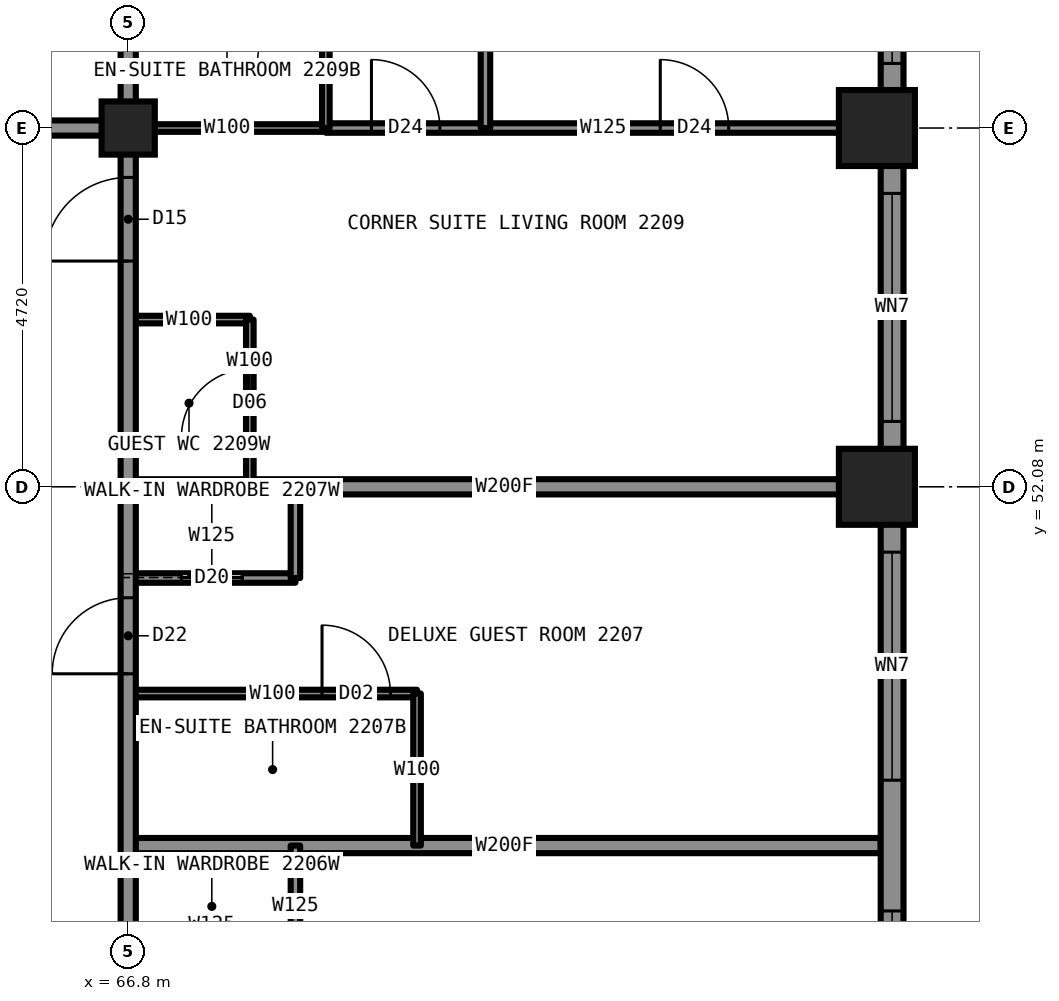
"""IFC4 building model, lengths in metres.
Left out: names, types, materials, properties, quantities, classifications, styles, units other than length and angle.
Written with IfcOpenShell. Run it as: python <this file> out.ifc"""

import sys

from ifc_helpers import new_model, si_unit, direction, frame, frame_2d, origin, origin_2d, place, context, subcontext, project, spatial, rectangle, hollow_rectangle, i_section, extrude, element, fill, save


model = new_model("IFC4")
c1 = context("Model", 3, precision=1e-05, world=origin(), true_north=direction((0.0, 1.0)))
c2 = subcontext(c1, "Body", "Model", "MODEL_VIEW")
j1 = project(units=[si_unit("LENGTHUNIT", "METRE"), si_unit("PLANEANGLEUNIT", "RADIAN")], contexts=[c1])
p1 = place(None, origin())
s1 = spatial("IfcSite", under=j1, at=p1, CompositionType="ELEMENT")
p2 = place(p1, origin())
s2 = spatial("IfcBuilding", under=s1, at=p2, CompositionType="ELEMENT")
p3 = place(p2, frame((0.0, 0.0, 81.0)))
s3 = spatial("IfcBuildingStorey", under=s2, at=p3, CompositionType="ELEMENT", Elevation=81.0)
for number, where, z_axis, x_axis in (
    (1, (76.65, 52.08, 0.0), (0.0, 0.0, 1.0), (1.0, 0.0, 0.0)),
    (2, (76.65, 56.8, 0.0), (0.0, 0.0, 1.0), (1.0, 0.0, 0.0)),
):
    element("IfcColumn", number, at=place(p3, frame(where, z_axis=z_axis, x_axis=x_axis)), inside=s3, PredefinedType="COLUMN", context=c2, shape_type="SweptSolid", body=[
        extrude(i_section(OverallWidth=0.432, OverallDepth=0.498, WebThickness=0.056, FlangeThickness=0.089, at=origin_2d()), origin(), (0.0, 0.0, 1.0), 3.5),
    ])
p4 = place(p3, frame((66.8, 56.8, 0.0), z_axis=(0.0, 0.0, 1.0), x_axis=(1.0, 0.0, 0.0)))
e3 = element("IfcColumn", 3, at=p4, inside=s3, PredefinedType="COLUMN", context=c2, shape_type="SweptSolid", body=[
    extrude(hollow_rectangle(XDim=0.7, YDim=0.7, WallThickness=0.06, at=origin_2d()), origin(), (0.0, 0.0, 1.0), 3.5),
])
p5 = place(p3, frame((66.8, 56.8, 0.0), z_axis=(0.0, 0.0, 1.0), x_axis=(1.0, 0.0, 0.0)))
e4 = element("IfcWall", 4, at=p5, inside=s3, PredefinedType="PARTITIONING", context=c2, shape_type="SweptSolid", body=[
    extrude(rectangle(XDim=2.6, YDim=0.1, at=frame_2d((1.3, 0.0))), origin(), (0.0, 0.0, 1.0), 2.573),
])
p6 = place(p3, frame((43.2, 56.8, 0.0), z_axis=(0.0, 0.0, 1.0), x_axis=(1.0, 0.0, 0.0)))
e5 = element("IfcWall", 5, at=p6, inside=s3, PredefinedType="PARTITIONING", context=c2, shape_type="SweptSolid", body=[
    extrude(rectangle(XDim=23.6, YDim=0.2, at=frame_2d((11.8, 0.0))), origin(), (0.0, 0.0, 1.0), 3.33),
])
p7 = place(p6, frame((0.7, 0.0, 0.0)))
e6 = element("IfcOpeningElement", 6, at=p7, cuts=e5, PredefinedType="OPENING", context=c2, shape_type="SweptSolid", body=[
    extrude(rectangle(XDim=1.0, YDim=2.2, at=frame_2d((0.5, 1.1))), frame((0.0, 0.11, 0.0), z_axis=(0.0, -1.0, 0.0), x_axis=(1.0, 0.0, 0.0)), (0.0, 0.0, 1.0), 0.22),
])
p8 = place(p6, frame((6.98, 0.0, 0.0)))
e7 = element("IfcOpeningElement", 7, at=p8, cuts=e5, PredefinedType="OPENING", context=c2, shape_type="SweptSolid", body=[
    extrude(rectangle(XDim=1.0, YDim=2.2, at=frame_2d((0.5, 1.1))), frame((0.0, 0.11, 0.0), z_axis=(0.0, -1.0, 0.0), x_axis=(1.0, 0.0, 0.0)), (0.0, 0.0, 1.0), 0.22),
])
p9 = place(p6, frame((11.29, 0.0, 0.0)))
e8 = element("IfcOpeningElement", 8, at=p9, cuts=e5, PredefinedType="OPENING", context=c2, shape_type="SweptSolid", body=[
    extrude(rectangle(XDim=1.1, YDim=2.2, at=frame_2d((0.55, 1.1))), frame((0.0, 0.11, 0.0), z_axis=(0.0, -1.0, 0.0), x_axis=(1.0, 0.0, 0.0)), (0.0, 0.0, 1.0), 0.22),
])
p10 = place(p3, frame((69.4, 56.8, 0.0), z_axis=(0.0, 0.0, 1.0), x_axis=(1.0, 0.0, 0.0)))
e9 = element("IfcWall", 9, at=p10, inside=s3, PredefinedType="PARTITIONING", context=c2, shape_type="SweptSolid", body=[
    extrude(rectangle(XDim=7.3, YDim=0.125, at=frame_2d((3.65, 0.0))), origin(), (0.0, 0.0, 1.0), 2.573),
])
p11 = place(p10, frame((0.6, 0.0, 0.0)))
e10 = element("IfcOpeningElement", 10, at=p11, cuts=e9, PredefinedType="OPENING", context=c2, shape_type="SweptSolid", body=[
    extrude(rectangle(XDim=0.9, YDim=2.2, at=frame_2d((0.45, 1.1))), frame((0.0, 0.073, 0.0), z_axis=(0.0, -1.0, 0.0), x_axis=(1.0, 0.0, 0.0)), (0.0, 0.0, 1.0), 0.145),
])
p12 = place(p10, frame((4.4, 0.0, 0.0)))
e11 = element("IfcOpeningElement", 11, at=p12, cuts=e9, PredefinedType="OPENING", context=c2, shape_type="SweptSolid", body=[
    extrude(rectangle(XDim=0.9, YDim=2.2, at=frame_2d((0.45, 1.1))), frame((0.0, 0.073, 0.0), z_axis=(0.0, -1.0, 0.0), x_axis=(1.0, 0.0, 0.0)), (0.0, 0.0, 1.0), 0.145),
])
p13 = place(p3, frame((66.8, 47.36, 0.0), z_axis=(0.0, 0.0, 1.0), x_axis=(1.0, 0.0, 0.0)))
e12 = element("IfcWall", 12, at=p13, inside=s3, PredefinedType="PARTITIONING", context=c2, shape_type="SweptSolid", body=[
    extrude(rectangle(XDim=9.9, YDim=0.2, at=frame_2d((4.95, 0.0))), origin(), (0.0, 0.0, 1.0), 2.723),
])
p14 = place(p3, frame((66.8, 49.36, 0.0), z_axis=(0.0, 0.0, 1.0), x_axis=(1.0, 0.0, 0.0)))
e13 = element("IfcWall", 13, at=p14, inside=s3, PredefinedType="PARTITIONING", context=c2, shape_type="SweptSolid", body=[
    extrude(rectangle(XDim=3.8, YDim=0.1, at=frame_2d((1.9, 0.0))), origin(), (0.0, 0.0, 1.0), 3.33),
])
p15 = place(p14, frame((2.55, 0.0, 0.0)))
e14 = element("IfcOpeningElement", 14, at=p15, cuts=e13, PredefinedType="OPENING", context=c2, shape_type="SweptSolid", body=[
    extrude(rectangle(XDim=0.9, YDim=2.1, at=frame_2d((0.45, 1.05))), frame((0.0, 0.06, 0.0), z_axis=(0.0, -1.0, 0.0), x_axis=(1.0, 0.0, 0.0)), (0.0, 0.0, 1.0), 0.12),
])
p16 = place(p3, frame((66.8, 50.88, 0.0), z_axis=(0.0, 0.0, 1.0), x_axis=(1.0, 0.0, 0.0)))
e15 = element("IfcWall", 15, at=p16, inside=s3, PredefinedType="PARTITIONING", context=c2, shape_type="SweptSolid", body=[
    extrude(rectangle(XDim=2.2, YDim=0.125, at=frame_2d((1.1, 0.0))), origin(), (0.0, 0.0, 1.0), 3.33),
])
p17 = place(p16, frame((0.7, 0.0, 0.0)))
e16 = element("IfcOpeningElement", 16, at=p17, cuts=e15, PredefinedType="OPENING", context=c2, shape_type="SweptSolid", body=[
    extrude(rectangle(XDim=0.8, YDim=2.1, at=frame_2d((0.4, 1.05))), frame((0.0, 0.073, 0.0), z_axis=(0.0, -1.0, 0.0), x_axis=(1.0, 0.0, 0.0)), (0.0, 0.0, 1.0), 0.145),
])
p18 = place(p3, frame((66.8, 52.08, 0.0), z_axis=(0.0, 0.0, 1.0), x_axis=(1.0, 0.0, 0.0)))
e17 = element("IfcWall", 17, at=p18, inside=s3, PredefinedType="PARTITIONING", context=c2, shape_type="SweptSolid", body=[
    extrude(rectangle(XDim=9.9, YDim=0.2, at=frame_2d((4.95, 0.0))), origin(), (0.0, 0.0, 1.0), 2.573),
])
p19 = place(p3, frame((66.8, 54.28, 0.0), z_axis=(0.0, 0.0, 1.0), x_axis=(1.0, 0.0, 0.0)))
e18 = element("IfcWall", 18, at=p19, inside=s3, PredefinedType="PARTITIONING", context=c2, shape_type="SweptSolid", body=[
    extrude(rectangle(XDim=1.6, YDim=0.1, at=frame_2d((0.8, 0.0))), origin(), (0.0, 0.0, 1.0), 2.723),
])
p20 = place(p3, frame((66.8, 33.2, 0.0), z_axis=(0.0, 0.0, 1.0), x_axis=(0.0, 1.0, 0.0)))
e19 = element("IfcWall", 19, at=p20, inside=s3, PredefinedType="PARTITIONING", context=c2, shape_type="SweptSolid", body=[
    extrude(rectangle(XDim=23.6, YDim=0.2, at=frame_2d((11.8, 0.0))), origin(), (0.0, 0.0, 1.0), 3.33),
])
p21 = place(p20, frame((7.72, 0.0, 0.0)))
e20 = element("IfcOpeningElement", 20, at=p21, cuts=e19, PredefinedType="OPENING", context=c2, shape_type="SweptSolid", body=[
    extrude(rectangle(XDim=1.0, YDim=2.2, at=frame_2d((0.5, 1.1))), frame((0.0, 0.11, 0.0), z_axis=(0.0, -1.0, 0.0), x_axis=(1.0, 0.0, 0.0)), (0.0, 0.0, 1.0), 0.22),
])
p22 = place(p20, frame((16.42, 0.0, 0.0)))
e21 = element("IfcOpeningElement", 21, at=p22, cuts=e19, PredefinedType="OPENING", context=c2, shape_type="SweptSolid", body=[
    extrude(rectangle(XDim=1.0, YDim=2.2, at=frame_2d((0.5, 1.1))), frame((0.0, 0.11, 0.0), z_axis=(0.0, -1.0, 0.0), x_axis=(1.0, 0.0, 0.0)), (0.0, 0.0, 1.0), 0.22),
])
p23 = place(p20, frame((21.85, 0.0, 0.0)))
e22 = element("IfcOpeningElement", 22, at=p23, cuts=e19, PredefinedType="OPENING", context=c2, shape_type="SweptSolid", body=[
    extrude(rectangle(XDim=1.1, YDim=2.2, at=frame_2d((0.55, 1.1))), frame((0.0, 0.11, 0.0), z_axis=(0.0, -1.0, 0.0), x_axis=(1.0, 0.0, 0.0)), (0.0, 0.0, 1.0), 0.22),
])
p24 = place(p20, frame((0.66, 0.0, 0.0)))
e23 = element("IfcOpeningElement", 23, at=p24, cuts=e19, PredefinedType="OPENING", context=c2, shape_type="SweptSolid", body=[
    extrude(rectangle(XDim=1.1, YDim=2.2, at=frame_2d((0.55, 1.1))), frame((0.0, 0.11, 0.0), z_axis=(0.0, -1.0, 0.0), x_axis=(1.0, 0.0, 0.0)), (0.0, 0.0, 1.0), 0.22),
])
p25 = place(p3, frame((66.8, 56.8, 0.0), z_axis=(0.0, 0.0, 1.0), x_axis=(0.0, 1.0, 0.0)))
e24 = element("IfcWall", 24, at=p25, inside=s3, PredefinedType="PARTITIONING", context=c2, shape_type="SweptSolid", body=[
    extrude(rectangle(XDim=9.9, YDim=0.2, at=frame_2d((4.95, 0.0))), origin(), (0.0, 0.0, 1.0), 2.573),
])
p26 = place(p3, frame((68.4, 52.08, 0.0), z_axis=(0.0, 0.0, 1.0), x_axis=(0.0, 1.0, 0.0)))
e25 = element("IfcWall", 25, at=p26, inside=s3, PredefinedType="PARTITIONING", context=c2, shape_type="SweptSolid", body=[
    extrude(rectangle(XDim=2.2, YDim=0.1, at=frame_2d((1.1, 0.0))), origin(), (0.0, 0.0, 1.0), 3.33),
])
p27 = place(p26, frame((0.65, 0.0, 0.0)))
e26 = element("IfcOpeningElement", 26, at=p27, cuts=e25, PredefinedType="OPENING", context=c2, shape_type="SweptSolid", body=[
    extrude(rectangle(XDim=0.9, YDim=2.1, at=frame_2d((0.45, 1.05))), frame((0.0, 0.06, 0.0), z_axis=(0.0, -1.0, 0.0), x_axis=(1.0, 0.0, 0.0)), (0.0, 0.0, 1.0), 0.12),
])
p28 = place(p3, frame((69.0, 45.76, 0.0), z_axis=(0.0, 0.0, 1.0), x_axis=(0.0, 1.0, 0.0)))
e27 = element("IfcWall", 27, at=p28, inside=s3, PredefinedType="PARTITIONING", context=c2, shape_type="SweptSolid", body=[
    extrude(rectangle(XDim=1.6, YDim=0.125, at=frame_2d((0.8, 0.0))), origin(), (0.0, 0.0, 1.0), 3.33),
])
p29 = place(p3, frame((69.0, 50.88, 0.0), z_axis=(0.0, 0.0, 1.0), x_axis=(0.0, 1.0, 0.0)))
e28 = element("IfcWall", 28, at=p29, inside=s3, PredefinedType="PARTITIONING", context=c2, shape_type="SweptSolid", body=[
    extrude(rectangle(XDim=1.2, YDim=0.125, at=frame_2d((0.6, 0.0))), origin(), (0.0, 0.0, 1.0), 3.33),
])
p30 = place(p3, frame((69.4, 56.8, 0.0), z_axis=(0.0, 0.0, 1.0), x_axis=(0.0, 1.0, 0.0)))
e29 = element("IfcWall", 29, at=p30, inside=s3, PredefinedType="PARTITIONING", context=c2, shape_type="SweptSolid", body=[
    extrude(rectangle(XDim=2.6, YDim=0.1, at=frame_2d((1.3, 0.0))), origin(), (0.0, 0.0, 1.0), 3.33),
])
p31 = place(p30, frame((0.85, 0.0, 0.0)))
e30 = element("IfcOpeningElement", 30, at=p31, cuts=e29, PredefinedType="OPENING", context=c2, shape_type="SweptSolid", body=[
    extrude(rectangle(XDim=0.9, YDim=2.1, at=frame_2d((0.45, 1.05))), frame((0.0, 0.06, 0.0), z_axis=(0.0, -1.0, 0.0), x_axis=(1.0, 0.0, 0.0)), (0.0, 0.0, 1.0), 0.12),
])
p32 = place(p3, frame((70.6, 47.36, 0.0), z_axis=(0.0, 0.0, 1.0), x_axis=(0.0, 1.0, 0.0)))
e31 = element("IfcWall", 31, at=p32, inside=s3, PredefinedType="PARTITIONING", context=c2, shape_type="SweptSolid", body=[
    extrude(rectangle(XDim=2.0, YDim=0.1, at=frame_2d((1.0, 0.0))), origin(), (0.0, 0.0, 1.0), 3.33),
])
p33 = place(p3, frame((71.5, 56.8, 0.0), z_axis=(0.0, 0.0, 1.0), x_axis=(0.0, 1.0, 0.0)))
e32 = element("IfcWall", 32, at=p33, inside=s3, PredefinedType="PARTITIONING", context=c2, shape_type="SweptSolid", body=[
    extrude(rectangle(XDim=9.894, YDim=0.125, at=frame_2d((4.947, 0.0))), origin(), (0.0, 0.0, 1.0), 3.33),
])
p34 = place(p3, frame((76.85, 28.5, 0.0), z_axis=(0.0, 0.0, 1.0), x_axis=(0.0, 1.0, 0.0)))
e33 = element("IfcWall", 33, at=p34, inside=s3, PredefinedType="SOLIDWALL", context=c2, shape_type="SweptSolid", body=[
    extrude(rectangle(XDim=33.0, YDim=0.3, at=frame_2d((16.5, 0.0))), origin(), (0.0, 0.0, 1.0), 2.63),
])
p35 = place(p34, frame((0.85, 0.0, 0.5)))
e34 = element("IfcOpeningElement", 34, at=p35, cuts=e33, PredefinedType="OPENING", context=c2, shape_type="SweptSolid", body=[
    extrude(rectangle(XDim=3.0, YDim=2.0, at=frame_2d((1.5, 1.0))), frame((0.0, 0.16, 0.0), z_axis=(0.0, -1.0, 0.0), x_axis=(1.0, 0.0, 0.0)), (0.0, 0.0, 1.0), 0.32),
])
p36 = place(p34, frame((5.56, 0.0, 0.5)))
e35 = element("IfcOpeningElement", 35, at=p36, cuts=e33, PredefinedType="OPENING", context=c2, shape_type="SweptSolid", body=[
    extrude(rectangle(XDim=3.0, YDim=2.0, at=frame_2d((1.5, 1.0))), frame((0.0, 0.16, 0.0), z_axis=(0.0, -1.0, 0.0), x_axis=(1.0, 0.0, 0.0)), (0.0, 0.0, 1.0), 0.32),
])
p37 = place(p34, frame((10.28, 0.0, 0.5)))
e36 = element("IfcOpeningElement", 36, at=p37, cuts=e33, PredefinedType="OPENING", context=c2, shape_type="SweptSolid", body=[
    extrude(rectangle(XDim=3.0, YDim=2.0, at=frame_2d((1.5, 1.0))), frame((0.0, 0.16, 0.0), z_axis=(0.0, -1.0, 0.0), x_axis=(1.0, 0.0, 0.0)), (0.0, 0.0, 1.0), 0.32),
])
p38 = place(p34, frame((15.0, 0.0, 0.5)))
e37 = element("IfcOpeningElement", 37, at=p38, cuts=e33, PredefinedType="OPENING", context=c2, shape_type="SweptSolid", body=[
    extrude(rectangle(XDim=3.0, YDim=2.0, at=frame_2d((1.5, 1.0))), frame((0.0, 0.16, 0.0), z_axis=(0.0, -1.0, 0.0), x_axis=(1.0, 0.0, 0.0)), (0.0, 0.0, 1.0), 0.32),
])
p39 = place(p34, frame((19.72, 0.0, 0.5)))
e38 = element("IfcOpeningElement", 38, at=p39, cuts=e33, PredefinedType="OPENING", context=c2, shape_type="SweptSolid", body=[
    extrude(rectangle(XDim=3.0, YDim=2.0, at=frame_2d((1.5, 1.0))), frame((0.0, 0.16, 0.0), z_axis=(0.0, -1.0, 0.0), x_axis=(1.0, 0.0, 0.0)), (0.0, 0.0, 1.0), 0.32),
])
p40 = place(p34, frame((24.44, 0.0, 0.5)))
e39 = element("IfcOpeningElement", 39, at=p40, cuts=e33, PredefinedType="OPENING", context=c2, shape_type="SweptSolid", body=[
    extrude(rectangle(XDim=3.0, YDim=2.0, at=frame_2d((1.5, 1.0))), frame((0.0, 0.16, 0.0), z_axis=(0.0, -1.0, 0.0), x_axis=(1.0, 0.0, 0.0)), (0.0, 0.0, 1.0), 0.32),
])
p41 = place(p34, frame((29.15, 0.0, 0.5)))
e40 = element("IfcOpeningElement", 40, at=p41, cuts=e33, PredefinedType="OPENING", context=c2, shape_type="SweptSolid", body=[
    extrude(rectangle(XDim=3.0, YDim=2.0, at=frame_2d((1.5, 1.0))), frame((0.0, 0.16, 0.0), z_axis=(0.0, -1.0, 0.0), x_axis=(1.0, 0.0, 0.0)), (0.0, 0.0, 1.0), 0.32),
])
p42 = place(p22, origin())
e41 = element("IfcDoor", 41, at=p42, inside=s3, OperationType="SINGLE_SWING_LEFT", PredefinedType="DOOR", context=c2, shape_type="SweptSolid", body=[
    extrude(rectangle(XDim=1.0, YDim=2.2, at=frame_2d((0.5, 1.1))), frame((0.0, 0.025, 0.0), z_axis=(0.0, -1.0, 0.0), x_axis=(1.0, 0.0, 0.0)), (0.0, 0.0, 1.0), 0.05),
])
fill(e21, e41)
p43 = place(p15, origin())
e42 = element("IfcDoor", 42, at=p43, inside=s3, OperationType="SINGLE_SWING_RIGHT", PredefinedType="DOOR", context=c2, shape_type="SweptSolid", body=[
    extrude(rectangle(XDim=0.9, YDim=2.1, at=frame_2d((0.45, 1.05))), frame((0.0, 0.025, 0.0), z_axis=(0.0, -1.0, 0.0), x_axis=(1.0, 0.0, 0.0)), (0.0, 0.0, 1.0), 0.05),
])
fill(e14, e42)
p44 = place(p17, origin())
e43 = element("IfcDoor", 43, at=p44, inside=s3, OperationType="SLIDING_TO_LEFT", PredefinedType="DOOR", context=c2, shape_type="SweptSolid", body=[
    extrude(rectangle(XDim=0.8, YDim=2.1, at=frame_2d((0.4, 1.05))), frame((0.0, 0.025, 0.0), z_axis=(0.0, -1.0, 0.0), x_axis=(1.0, 0.0, 0.0)), (0.0, 0.0, 1.0), 0.05),
])
fill(e16, e43)
p45 = place(p23, origin())
e44 = element("IfcDoor", 44, at=p45, inside=s3, OperationType="SINGLE_SWING_LEFT", PredefinedType="DOOR", context=c2, shape_type="SweptSolid", body=[
    extrude(rectangle(XDim=1.1, YDim=2.2, at=frame_2d((0.55, 1.1))), frame((0.0, 0.025, 0.0), z_axis=(0.0, -1.0, 0.0), x_axis=(1.0, 0.0, 0.0)), (0.0, 0.0, 1.0), 0.05),
])
fill(e22, e44)
p46 = place(p31, origin())
e45 = element("IfcDoor", 45, at=p46, inside=s3, OperationType="SINGLE_SWING_RIGHT", PredefinedType="DOOR", context=c2, shape_type="SweptSolid", body=[
    extrude(rectangle(XDim=0.9, YDim=2.1, at=frame_2d((0.45, 1.05))), frame((0.0, 0.025, 0.0), z_axis=(0.0, -1.0, 0.0), x_axis=(1.0, 0.0, 0.0)), (0.0, 0.0, 1.0), 0.05),
])
fill(e30, e45)
p47 = place(p11, origin())
e46 = element("IfcDoor", 46, at=p47, inside=s3, OperationType="SINGLE_SWING_LEFT", PredefinedType="DOOR", context=c2, shape_type="SweptSolid", body=[
    extrude(rectangle(XDim=0.9, YDim=2.2, at=frame_2d((0.45, 1.1))), frame((0.0, 0.025, 0.0), z_axis=(0.0, -1.0, 0.0), x_axis=(1.0, 0.0, 0.0)), (0.0, 0.0, 1.0), 0.05),
])
fill(e10, e46)
p48 = place(p12, origin())
e47 = element("IfcDoor", 47, at=p48, inside=s3, OperationType="SINGLE_SWING_LEFT", PredefinedType="DOOR", context=c2, shape_type="SweptSolid", body=[
    extrude(rectangle(XDim=0.9, YDim=2.2, at=frame_2d((0.45, 1.1))), frame((0.0, 0.025, 0.0), z_axis=(0.0, -1.0, 0.0), x_axis=(1.0, 0.0, 0.0)), (0.0, 0.0, 1.0), 0.05),
])
fill(e11, e47)
p49 = place(p27, origin())
e48 = element("IfcDoor", 48, at=p49, inside=s3, OperationType="SINGLE_SWING_LEFT", PredefinedType="DOOR", context=c2, shape_type="SweptSolid", body=[
    extrude(rectangle(XDim=0.9, YDim=2.1, at=frame_2d((0.45, 1.05))), frame((0.0, 0.025, 0.0), z_axis=(0.0, -1.0, 0.0), x_axis=(1.0, 0.0, 0.0)), (0.0, 0.0, 1.0), 0.05),
])
fill(e26, e48)
p50 = place(p38, origin())
e49 = element("IfcWindow", 49, at=p50, inside=s3, PartitioningType="SINGLE_PANEL", PredefinedType="WINDOW", context=c2, shape_type="SweptSolid", body=[
    extrude(rectangle(XDim=3.0, YDim=2.0, at=frame_2d((1.5, 1.0))), frame((0.0, 0.03, 0.0), z_axis=(0.0, -1.0, 0.0), x_axis=(1.0, 0.0, 0.0)), (0.0, 0.0, 1.0), 0.06),
])
fill(e37, e49)
p51 = place(p39, origin())
e50 = element("IfcWindow", 50, at=p51, inside=s3, PartitioningType="SINGLE_PANEL", PredefinedType="WINDOW", context=c2, shape_type="SweptSolid", body=[
    extrude(rectangle(XDim=3.0, YDim=2.0, at=frame_2d((1.5, 1.0))), frame((0.0, 0.03, 0.0), z_axis=(0.0, -1.0, 0.0), x_axis=(1.0, 0.0, 0.0)), (0.0, 0.0, 1.0), 0.06),
])
fill(e38, e50)
p52 = place(p40, origin())
e51 = element("IfcWindow", 51, at=p52, inside=s3, PartitioningType="SINGLE_PANEL", PredefinedType="WINDOW", context=c2, shape_type="SweptSolid", body=[
    extrude(rectangle(XDim=3.0, YDim=2.0, at=frame_2d((1.5, 1.0))), frame((0.0, 0.03, 0.0), z_axis=(0.0, -1.0, 0.0), x_axis=(1.0, 0.0, 0.0)), (0.0, 0.0, 1.0), 0.06),
])
fill(e39, e51)
p53 = place(p41, origin())
e52 = element("IfcWindow", 52, at=p53, inside=s3, PartitioningType="SINGLE_PANEL", PredefinedType="WINDOW", context=c2, shape_type="SweptSolid", body=[
    extrude(rectangle(XDim=3.0, YDim=2.0, at=frame_2d((1.5, 1.0))), frame((0.0, 0.03, 0.0), z_axis=(0.0, -1.0, 0.0), x_axis=(1.0, 0.0, 0.0)), (0.0, 0.0, 1.0), 0.06),
])
fill(e40, e52)
save(model, sys.argv[1])
